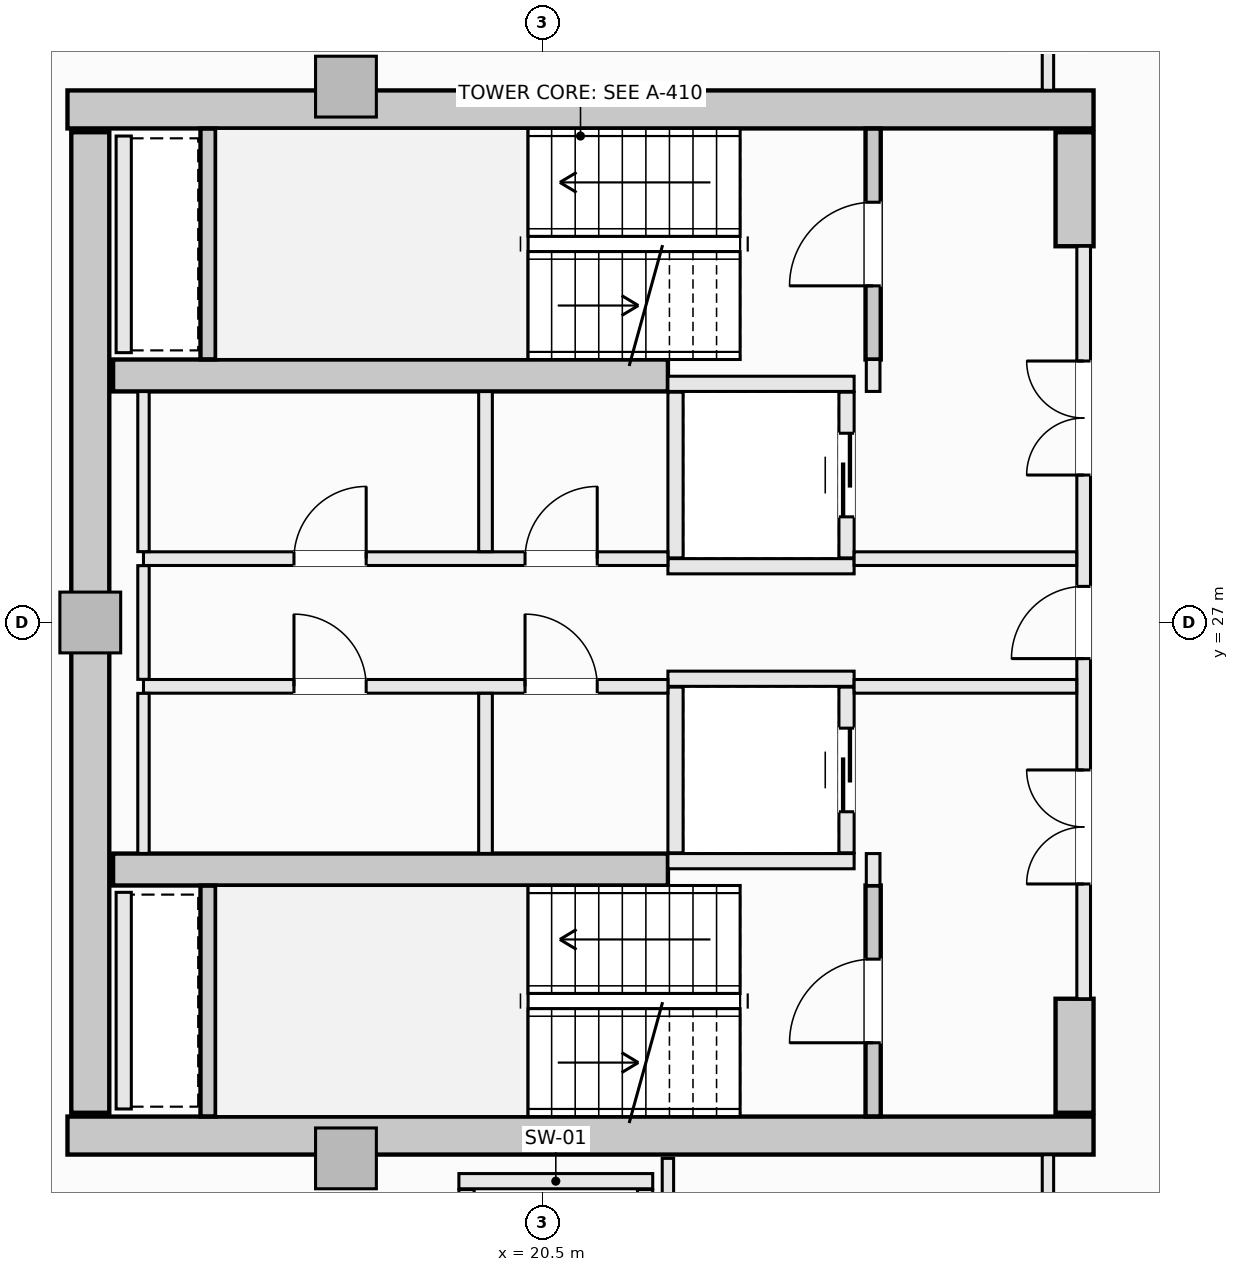
"""IFC4 building model, lengths in metres.
Left out: names, types, materials, properties, quantities, classifications, styles, units other than length and angle.
Written with IfcOpenShell. Run it as: python <this file> out.ifc"""

import sys

from ifc_helpers import new_model, si_unit, direction, frame, frame_2d, origin, origin_2d, place, context, subcontext, project, spatial, rectangle, extrude, element, fill, save


model = new_model("IFC4")
c1 = context("Model", 3, precision=1e-05, world=origin(), true_north=direction((0.0, 1.0)))
c2 = subcontext(c1, "Body", "Model", "MODEL_VIEW")
j1 = project(units=[si_unit("LENGTHUNIT", "METRE"), si_unit("PLANEANGLEUNIT", "RADIAN")], contexts=[c1])
p1 = place(None, origin())
s1 = spatial("IfcSite", under=j1, at=p1, CompositionType="ELEMENT")
p2 = place(p1, origin())
s2 = spatial("IfcBuilding", under=s1, at=p2, CompositionType="ELEMENT")
p3 = place(p2, frame((0.0, 0.0, 255.8)))
s3 = spatial("IfcBuildingStorey", under=s2, at=p3, CompositionType="ELEMENT", Elevation=255.8)
for number, where, z_axis, x_axis in (
    (1, (14.25, 33.75, -0.27), (0.0, 0.0, 1.0), (1.0, 0.0, 0.0)),
    (2, (14.25, 20.25, -0.27), (0.0, 0.0, 1.0), (1.0, 0.0, 0.0)),
):
    element("IfcWall", number, at=place(p3, frame(where, z_axis=z_axis, x_axis=x_axis)), inside=s3, PredefinedType="SHEAR", context=c2, shape_type="SweptSolid", body=[
        extrude(rectangle(XDim=13.5, YDim=0.5, at=frame_2d((6.75, 0.0))), origin(), (0.0, 0.0, 1.0), 3.3),
    ])
p4 = place(p3, frame((14.55, 20.55, -0.27), z_axis=(0.0, 0.0, 1.0), x_axis=(0.0, 1.0, 0.0)))
e3 = element("IfcWall", 3, at=p4, inside=s3, PredefinedType="SHEAR", context=c2, shape_type="SweptSolid", body=[
    extrude(rectangle(XDim=12.9, YDim=0.5, at=frame_2d((6.45, 0.0))), origin(), (0.0, 0.0, 1.0), 3.3),
])
for number, where, z_axis, x_axis in (
    (4, (27.5, 31.95, -0.27), (0.0, 0.0, 1.0), (0.0, 1.0, 0.0)),
    (5, (27.5, 20.55, -0.27), (0.0, 0.0, 1.0), (0.0, 1.0, 0.0)),
):
    element("IfcWall", number, at=place(p3, frame(where, z_axis=z_axis, x_axis=x_axis)), inside=s3, PredefinedType="SHEAR", context=c2, shape_type="SweptSolid", body=[
        extrude(rectangle(XDim=1.5, YDim=0.5, at=frame_2d((0.75, 0.0))), origin(), (0.0, 0.0, 1.0), 3.3),
    ])
for number, where, z_axis, x_axis in (
    (6, (14.85, 30.25, -0.27), (0.0, 0.0, 1.0), (1.0, 0.0, 0.0)),
    (7, (14.85, 23.75, -0.27), (0.0, 0.0, 1.0), (1.0, 0.0, 0.0)),
):
    element("IfcWall", number, at=place(p3, frame(where, z_axis=z_axis, x_axis=x_axis)), inside=s3, PredefinedType="SHEAR", context=c2, shape_type="SweptSolid", body=[
        extrude(rectangle(XDim=7.3, YDim=0.42, at=frame_2d((3.65, 0.0))), origin(), (0.0, 0.0, 1.0), 3.3),
    ])
for number, where, z_axis, x_axis in (
    (8, (17.914, 34.05, -0.27), (0.0, 0.0, 1.0), (1.0, 0.0, 0.0)),
    (9, (14.55, 27.0, -0.27), (0.0, 0.0, 1.0), (1.0, 0.0, 0.0)),
    (10, (17.914, 19.95, -0.27), (0.0, 0.0, 1.0), (1.0, 0.0, 0.0)),
):
    element("IfcColumn", number, at=place(p3, frame(where, z_axis=z_axis, x_axis=x_axis)), inside=s3, PredefinedType="PILASTER", context=c2, shape_type="SweptSolid", body=[
        extrude(rectangle(XDim=0.8, YDim=0.8, at=origin_2d()), origin(), (0.0, 0.0, 1.0), 3.3),
    ])
p5 = place(p3, frame((24.85, 30.46, -0.27), z_axis=(0.0, 0.0, 1.0), x_axis=(0.0, 1.0, 0.0)))
e11 = element("IfcWall", 11, at=p5, inside=s3, PredefinedType="SHEAR", context=c2, shape_type="SweptSolid", body=[
    extrude(rectangle(XDim=3.038, YDim=0.2, at=frame_2d((1.519, 0.0))), origin(), (0.0, 0.0, 1.0), 3.3),
])
p6 = place(p5, frame((0.969, 0.0, 0.27)))
e12 = element("IfcOpeningElement", 12, at=p6, cuts=e11, PredefinedType="OPENING", context=c2, shape_type="SweptSolid", body=[
    extrude(rectangle(XDim=1.1, YDim=2.15, at=frame_2d((0.55, 1.075))), frame((0.0, 0.11, 0.0), z_axis=(0.0, -1.0, 0.0), x_axis=(1.0, 0.0, 0.0)), (0.0, 0.0, 1.0), 0.22),
])
p7 = place(p3, frame((16.1, 30.462, -0.27), z_axis=(0.0, 0.0, 1.0), x_axis=(0.0, 1.0, 0.0)))
e13 = element("IfcWall", 13, at=p7, inside=s3, PredefinedType="SHEAR", context=c2, shape_type="SweptSolid", body=[
    extrude(rectangle(XDim=3.036, YDim=0.2, at=frame_2d((1.518, 0.0))), origin(), (0.0, 0.0, 1.0), 3.3),
])
p8 = place(p3, frame((24.85, 20.502, -0.27), z_axis=(0.0, 0.0, 1.0), x_axis=(0.0, 1.0, 0.0)))
e14 = element("IfcWall", 14, at=p8, inside=s3, PredefinedType="SHEAR", context=c2, shape_type="SweptSolid", body=[
    extrude(rectangle(XDim=3.038, YDim=0.2, at=frame_2d((1.519, 0.0))), origin(), (0.0, 0.0, 1.0), 3.3),
])
p9 = place(p8, frame((0.969, 0.0, 0.27)))
e15 = element("IfcOpeningElement", 15, at=p9, cuts=e14, PredefinedType="OPENING", context=c2, shape_type="SweptSolid", body=[
    extrude(rectangle(XDim=1.1, YDim=2.15, at=frame_2d((0.55, 1.075))), frame((0.0, 0.11, 0.0), z_axis=(0.0, -1.0, 0.0), x_axis=(1.0, 0.0, 0.0)), (0.0, 0.0, 1.0), 0.22),
])
p10 = place(p3, frame((16.1, 20.502, -0.27), z_axis=(0.0, 0.0, 1.0), x_axis=(0.0, 1.0, 0.0)))
e16 = element("IfcWall", 16, at=p10, inside=s3, PredefinedType="SHEAR", context=c2, shape_type="SweptSolid", body=[
    extrude(rectangle(XDim=3.036, YDim=0.2, at=frame_2d((1.518, 0.0))), origin(), (0.0, 0.0, 1.0), 3.3),
])
for number, where, z_axis, x_axis in (
    (17, (22.15, 30.14, 0.0), (0.0, 0.0, 1.0), (1.0, 0.0, 0.0)),
    (18, (22.15, 27.74, 0.0), (0.0, 0.0, 1.0), (1.0, 0.0, 0.0)),
):
    element("IfcWall", number, at=place(p3, frame(where, z_axis=z_axis, x_axis=x_axis)), inside=s3, PredefinedType="SOLIDWALL", context=c2, shape_type="SweptSolid", body=[
        extrude(rectangle(XDim=2.45, YDim=0.2, at=frame_2d((1.225, 0.0))), origin(), (0.0, 0.0, 1.0), 3.03),
    ])
p11 = place(p3, frame((22.25, 27.85, 0.0), z_axis=(0.0, 0.0, 1.0), x_axis=(0.0, 1.0, 0.0)))
e19 = element("IfcWall", 19, at=p11, inside=s3, PredefinedType="SOLIDWALL", context=c2, shape_type="SweptSolid", body=[
    extrude(rectangle(XDim=2.18, YDim=0.2, at=frame_2d((1.09, 0.0))), origin(), (0.0, 0.0, 1.0), 3.03),
])
p12 = place(p3, frame((24.5, 27.85, 0.0), z_axis=(0.0, 0.0, 1.0), x_axis=(0.0, 1.0, 0.0)))
e20 = element("IfcWall", 20, at=p12, inside=s3, PredefinedType="SOLIDWALL", context=c2, shape_type="SweptSolid", body=[
    extrude(rectangle(XDim=2.18, YDim=0.2, at=frame_2d((1.09, 0.0))), origin(), (0.0, 0.0, 1.0), 3.03),
])
p13 = place(p12, frame((0.54, 0.0, 0.0)))
e21 = element("IfcOpeningElement", 21, at=p13, cuts=e20, PredefinedType="OPENING", context=c2, shape_type="SweptSolid", body=[
    extrude(rectangle(XDim=1.1, YDim=2.2, at=frame_2d((0.55, 1.1))), frame((0.0, 0.11, 0.0), z_axis=(0.0, -1.0, 0.0), x_axis=(1.0, 0.0, 0.0)), (0.0, 0.0, 1.0), 0.22),
])
for number, where, z_axis, x_axis in (
    (22, (22.15, 26.26, 0.0), (0.0, 0.0, 1.0), (1.0, 0.0, 0.0)),
    (23, (22.15, 23.86, 0.0), (0.0, 0.0, 1.0), (1.0, 0.0, 0.0)),
):
    element("IfcWall", number, at=place(p3, frame(where, z_axis=z_axis, x_axis=x_axis)), inside=s3, PredefinedType="SOLIDWALL", context=c2, shape_type="SweptSolid", body=[
        extrude(rectangle(XDim=2.45, YDim=0.2, at=frame_2d((1.225, 0.0))), origin(), (0.0, 0.0, 1.0), 3.03),
    ])
p14 = place(p3, frame((22.25, 23.97, 0.0), z_axis=(0.0, 0.0, 1.0), x_axis=(0.0, 1.0, 0.0)))
e24 = element("IfcWall", 24, at=p14, inside=s3, PredefinedType="SOLIDWALL", context=c2, shape_type="SweptSolid", body=[
    extrude(rectangle(XDim=2.18, YDim=0.2, at=frame_2d((1.09, 0.0))), origin(), (0.0, 0.0, 1.0), 3.03),
])
p15 = place(p3, frame((24.5, 23.97, 0.0), z_axis=(0.0, 0.0, 1.0), x_axis=(0.0, 1.0, 0.0)))
e25 = element("IfcWall", 25, at=p15, inside=s3, PredefinedType="SOLIDWALL", context=c2, shape_type="SweptSolid", body=[
    extrude(rectangle(XDim=2.18, YDim=0.2, at=frame_2d((1.09, 0.0))), origin(), (0.0, 0.0, 1.0), 3.03),
])
p16 = place(p15, frame((0.54, 0.0, 0.0)))
e26 = element("IfcOpeningElement", 26, at=p16, cuts=e25, PredefinedType="OPENING", context=c2, shape_type="SweptSolid", body=[
    extrude(rectangle(XDim=1.1, YDim=2.2, at=frame_2d((0.55, 1.1))), frame((0.0, 0.11, 0.0), z_axis=(0.0, -1.0, 0.0), x_axis=(1.0, 0.0, 0.0)), (0.0, 0.0, 1.0), 0.22),
])
p17 = place(p3, frame((19.4, 19.65, 0.0), z_axis=(0.0, 0.0, 1.0), x_axis=(1.0, 0.0, 0.0)))
e27 = element("IfcWall", 27, at=p17, inside=s3, PredefinedType="SOLIDWALL", context=c2, shape_type="SweptSolid", body=[
    extrude(rectangle(XDim=2.55, YDim=0.2, at=frame_2d((1.275, 0.0))), origin(), (0.0, 0.0, 1.0), 3.03),
])
for number, where, z_axis, x_axis in (
    (28, (19.5, 17.01, 0.0), (0.0, 0.0, 1.0), (0.0, 1.0, 0.0)),
    (29, (21.85, 17.01, 0.0), (0.0, 0.0, 1.0), (0.0, 1.0, 0.0)),
):
    element("IfcWall", number, at=place(p3, frame(where, z_axis=z_axis, x_axis=x_axis)), inside=s3, PredefinedType="SOLIDWALL", context=c2, shape_type="SweptSolid", body=[
        extrude(rectangle(XDim=2.53, YDim=0.2, at=frame_2d((1.265, 0.0))), origin(), (0.0, 0.0, 1.0), 3.03),
    ])
for number, where, z_axis, x_axis in (
    (30, (14.99, 30.55, 0.0), (0.0, 0.0, 1.0), (0.0, 1.0, 0.0)),
    (31, (14.99, 20.6, 0.0), (0.0, 0.0, 1.0), (0.0, 1.0, 0.0)),
):
    element("IfcWall", number, at=place(p3, frame(where, z_axis=z_axis, x_axis=x_axis)), inside=s3, PredefinedType="SOLIDWALL", context=c2, shape_type="SweptSolid", body=[
        extrude(rectangle(XDim=2.85, YDim=0.2, at=frame_2d((1.425, 0.0))), origin(), (0.0, 0.0, 1.0), 3.03),
    ])
for number, where, z_axis, x_axis in (
    (32, (24.85, 23.54, 0.0), (0.0, 0.0, 1.0), (0.0, 1.0, 0.0)),
    (33, (24.85, 30.04, 0.0), (0.0, 0.0, 1.0), (0.0, 1.0, 0.0)),
):
    element("IfcWall", number, at=place(p3, frame(where, z_axis=z_axis, x_axis=x_axis)), inside=s3, PredefinedType="SOLIDWALL", context=c2, shape_type="SweptSolid", body=[
        extrude(rectangle(XDim=0.42, YDim=0.18, at=frame_2d((0.21, 0.0))), origin(), (0.0, 0.0, 1.0), 3.03),
    ])
p18 = place(p3, frame((27.62, 22.05, 0.0), z_axis=(0.0, 0.0, 1.0), x_axis=(0.0, 1.0, 0.0)))
e34 = element("IfcWall", 34, at=p18, inside=s3, PredefinedType="SOLIDWALL", context=c2, shape_type="SweptSolid", body=[
    extrude(rectangle(XDim=9.9, YDim=0.18, at=frame_2d((4.95, 0.0))), origin(), (0.0, 0.0, 1.0), 3.03),
])
p19 = place(p18, frame((4.475, 0.0, 0.0)))
e35 = element("IfcOpeningElement", 35, at=p19, cuts=e34, PredefinedType="OPENING", context=c2, shape_type="SweptSolid", body=[
    extrude(rectangle(XDim=0.95, YDim=2.1, at=frame_2d((0.475, 1.05))), frame((0.0, 0.1, 0.0), z_axis=(0.0, -1.0, 0.0), x_axis=(1.0, 0.0, 0.0)), (0.0, 0.0, 1.0), 0.2),
])
p20 = place(p18, frame((6.89, 0.0, 0.0)))
e36 = element("IfcOpeningElement", 36, at=p20, cuts=e34, PredefinedType="OPENING", context=c2, shape_type="SweptSolid", body=[
    extrude(rectangle(XDim=1.5, YDim=2.2, at=frame_2d((0.75, 1.1))), frame((0.0, 0.1, 0.0), z_axis=(0.0, -1.0, 0.0), x_axis=(1.0, 0.0, 0.0)), (0.0, 0.0, 1.0), 0.2),
])
p21 = place(p18, frame((1.51, 0.0, 0.0)))
e37 = element("IfcOpeningElement", 37, at=p21, cuts=e34, PredefinedType="OPENING", context=c2, shape_type="SweptSolid", body=[
    extrude(rectangle(XDim=1.5, YDim=2.2, at=frame_2d((0.75, 1.1))), frame((0.0, 0.1, 0.0), z_axis=(0.0, -1.0, 0.0), x_axis=(1.0, 0.0, 0.0)), (0.0, 0.0, 1.0), 0.2),
])
p22 = place(p3, frame((15.25, 27.84, 0.0), z_axis=(0.0, 0.0, 1.0), x_axis=(1.0, 0.0, 0.0)))
e38 = element("IfcWall", 38, at=p22, inside=s3, PredefinedType="SOLIDWALL", context=c2, shape_type="SweptSolid", body=[
    extrude(rectangle(XDim=6.9, YDim=0.18, at=frame_2d((3.45, 0.0))), origin(), (0.0, 0.0, 1.0), 3.03),
])
p23 = place(p22, frame((5.02, 0.0, 0.0)))
e39 = element("IfcOpeningElement", 39, at=p23, cuts=e38, PredefinedType="OPENING", context=c2, shape_type="SweptSolid", body=[
    extrude(rectangle(XDim=0.95, YDim=2.1, at=frame_2d((0.475, 1.05))), frame((0.0, 0.1, 0.0), z_axis=(0.0, -1.0, 0.0), x_axis=(1.0, 0.0, 0.0)), (0.0, 0.0, 1.0), 0.2),
])
p24 = place(p22, frame((1.98, 0.0, 0.0)))
e40 = element("IfcOpeningElement", 40, at=p24, cuts=e38, PredefinedType="OPENING", context=c2, shape_type="SweptSolid", body=[
    extrude(rectangle(XDim=0.95, YDim=2.1, at=frame_2d((0.475, 1.05))), frame((0.0, 0.1, 0.0), z_axis=(0.0, -1.0, 0.0), x_axis=(1.0, 0.0, 0.0)), (0.0, 0.0, 1.0), 0.2),
])
p25 = place(p3, frame((24.6, 27.84, 0.0), z_axis=(0.0, 0.0, 1.0), x_axis=(1.0, 0.0, 0.0)))
e41 = element("IfcWall", 41, at=p25, inside=s3, PredefinedType="SOLIDWALL", context=c2, shape_type="SweptSolid", body=[
    extrude(rectangle(XDim=2.928, YDim=0.18, at=frame_2d((1.464, 0.0))), origin(), (0.0, 0.0, 1.0), 3.03),
])
p26 = place(p3, frame((15.25, 26.16, 0.0), z_axis=(0.0, 0.0, 1.0), x_axis=(1.0, 0.0, 0.0)))
e42 = element("IfcWall", 42, at=p26, inside=s3, PredefinedType="SOLIDWALL", context=c2, shape_type="SweptSolid", body=[
    extrude(rectangle(XDim=6.9, YDim=0.18, at=frame_2d((3.45, 0.0))), origin(), (0.0, 0.0, 1.0), 3.03),
])
p27 = place(p26, frame((5.02, 0.0, 0.0)))
e43 = element("IfcOpeningElement", 43, at=p27, cuts=e42, PredefinedType="OPENING", context=c2, shape_type="SweptSolid", body=[
    extrude(rectangle(XDim=0.95, YDim=2.1, at=frame_2d((0.475, 1.05))), frame((0.0, 0.1, 0.0), z_axis=(0.0, -1.0, 0.0), x_axis=(1.0, 0.0, 0.0)), (0.0, 0.0, 1.0), 0.2),
])
p28 = place(p26, frame((1.98, 0.0, 0.0)))
e44 = element("IfcOpeningElement", 44, at=p28, cuts=e42, PredefinedType="OPENING", context=c2, shape_type="SweptSolid", body=[
    extrude(rectangle(XDim=0.95, YDim=2.1, at=frame_2d((0.475, 1.05))), frame((0.0, 0.1, 0.0), z_axis=(0.0, -1.0, 0.0), x_axis=(1.0, 0.0, 0.0)), (0.0, 0.0, 1.0), 0.2),
])
p29 = place(p3, frame((24.6, 26.16, 0.0), z_axis=(0.0, 0.0, 1.0), x_axis=(1.0, 0.0, 0.0)))
e45 = element("IfcWall", 45, at=p29, inside=s3, PredefinedType="SOLIDWALL", context=c2, shape_type="SweptSolid", body=[
    extrude(rectangle(XDim=2.928, YDim=0.18, at=frame_2d((1.464, 0.0))), origin(), (0.0, 0.0, 1.0), 3.03),
])
p30 = place(p3, frame((15.25, 23.962, 0.0), z_axis=(0.0, 0.0, 1.0), x_axis=(0.0, 1.0, 0.0)))
e46 = element("IfcWall", 46, at=p30, inside=s3, PredefinedType="PARTITIONING", context=c2, shape_type="SweptSolid", body=[
    extrude(rectangle(XDim=2.106, YDim=0.15, at=frame_2d((1.053, 0.0))), origin(), (0.0, 0.0, 1.0), 3.03),
])
p31 = place(p3, frame((15.25, 26.252, 0.0), z_axis=(0.0, 0.0, 1.0), x_axis=(0.0, 1.0, 0.0)))
e47 = element("IfcWall", 47, at=p31, inside=s3, PredefinedType="PARTITIONING", context=c2, shape_type="SweptSolid", body=[
    extrude(rectangle(XDim=1.496, YDim=0.15, at=frame_2d((0.748, 0.0))), origin(), (0.0, 0.0, 1.0), 3.03),
])
p32 = place(p3, frame((15.25, 27.932, 0.0), z_axis=(0.0, 0.0, 1.0), x_axis=(0.0, 1.0, 0.0)))
e48 = element("IfcWall", 48, at=p32, inside=s3, PredefinedType="PARTITIONING", context=c2, shape_type="SweptSolid", body=[
    extrude(rectangle(XDim=2.106, YDim=0.15, at=frame_2d((1.053, 0.0))), origin(), (0.0, 0.0, 1.0), 3.03),
])
for number, where, z_axis, x_axis in (
    (49, (19.75, 23.962, 0.0), (0.0, 0.0, 1.0), (0.0, 1.0, 0.0)),
    (50, (19.75, 27.932, 0.0), (0.0, 0.0, 1.0), (0.0, 1.0, 0.0)),
):
    element("IfcWall", number, at=place(p3, frame(where, z_axis=z_axis, x_axis=x_axis)), inside=s3, PredefinedType="SOLIDWALL", context=c2, shape_type="SweptSolid", body=[
        extrude(rectangle(XDim=2.106, YDim=0.18, at=frame_2d((1.053, 0.0))), origin(), (0.0, 0.0, 1.0), 3.03),
    ])
p33 = place(p3, frame((22.15, 17.127, 0.0), z_axis=(0.0, 0.0, 1.0), x_axis=(0.0, 1.0, 0.0)))
e51 = element("IfcWall", 51, at=p33, inside=s3, PredefinedType="PARTITIONING", context=c2, shape_type="SweptSolid", body=[
    extrude(rectangle(XDim=2.823, YDim=0.15, at=frame_2d((1.412, 0.0))), origin(), (0.0, 0.0, 1.0), 3.03),
])
p34 = place(p3, frame((27.15, 17.127, 0.0), z_axis=(0.0, 0.0, 1.0), x_axis=(0.0, 1.0, 0.0)))
e52 = element("IfcWall", 52, at=p34, inside=s3, PredefinedType="PARTITIONING", context=c2, shape_type="SweptSolid", body=[
    extrude(rectangle(XDim=2.871, YDim=0.15, at=frame_2d((1.436, 0.0))), origin(), (0.0, 0.0, 1.0), 3.03),
])
p35 = place(p34, frame((0.96, 0.0, 0.0)))
e53 = element("IfcOpeningElement", 53, at=p35, cuts=e52, PredefinedType="OPENING", context=c2, shape_type="SweptSolid", body=[
    extrude(rectangle(XDim=0.95, YDim=2.1, at=frame_2d((0.475, 1.05))), frame((0.0, 0.085, 0.0), z_axis=(0.0, -1.0, 0.0), x_axis=(1.0, 0.0, 0.0)), (0.0, 0.0, 1.0), 0.17),
])
p36 = place(p3, frame((27.15, 34.002, 0.0), z_axis=(0.0, 0.0, 1.0), x_axis=(0.0, 1.0, 0.0)))
e54 = element("IfcWall", 54, at=p36, inside=s3, PredefinedType="PARTITIONING", context=c2, shape_type="SweptSolid", body=[
    extrude(rectangle(XDim=4.198, YDim=0.15, at=frame_2d((2.099, 0.0))), origin(), (0.0, 0.0, 1.0), 3.03),
])
p37 = place(p36, frame((1.998, 0.0, 0.0)))
e55 = element("IfcOpeningElement", 55, at=p37, cuts=e54, PredefinedType="OPENING", context=c2, shape_type="SweptSolid", body=[
    extrude(rectangle(XDim=0.95, YDim=2.1, at=frame_2d((0.475, 1.05))), frame((0.0, 0.085, 0.0), z_axis=(0.0, -1.0, 0.0), x_axis=(1.0, 0.0, 0.0)), (0.0, 0.0, 1.0), 0.17),
])
p38 = place(p6, origin())
e56 = element("IfcDoor", 56, at=p38, inside=s3, OperationType="SINGLE_SWING_LEFT", PredefinedType="DOOR", context=c2, shape_type="SweptSolid", body=[
    extrude(rectangle(XDim=1.1, YDim=2.15, at=frame_2d((0.55, 1.075))), frame((0.0, 0.025, 0.0), z_axis=(0.0, -1.0, 0.0), x_axis=(1.0, 0.0, 0.0)), (0.0, 0.0, 1.0), 0.05),
])
fill(e12, e56)
p39 = place(p9, origin())
e57 = element("IfcDoor", 57, at=p39, inside=s3, OperationType="SINGLE_SWING_LEFT", PredefinedType="DOOR", context=c2, shape_type="SweptSolid", body=[
    extrude(rectangle(XDim=1.1, YDim=2.15, at=frame_2d((0.55, 1.075))), frame((0.0, 0.025, 0.0), z_axis=(0.0, -1.0, 0.0), x_axis=(1.0, 0.0, 0.0)), (0.0, 0.0, 1.0), 0.05),
])
fill(e15, e57)
p40 = place(p13, origin())
e58 = element("IfcDoor", 58, at=p40, inside=s3, OperationType="SLIDING_TO_LEFT", PredefinedType="DOOR", context=c2, shape_type="SweptSolid", body=[
    extrude(rectangle(XDim=1.1, YDim=2.2, at=frame_2d((0.55, 1.1))), frame((0.0, 0.025, 0.0), z_axis=(0.0, -1.0, 0.0), x_axis=(1.0, 0.0, 0.0)), (0.0, 0.0, 1.0), 0.05),
])
fill(e21, e58)
p41 = place(p16, origin())
e59 = element("IfcDoor", 59, at=p41, inside=s3, OperationType="SLIDING_TO_LEFT", PredefinedType="DOOR", context=c2, shape_type="SweptSolid", body=[
    extrude(rectangle(XDim=1.1, YDim=2.2, at=frame_2d((0.55, 1.1))), frame((0.0, 0.025, 0.0), z_axis=(0.0, -1.0, 0.0), x_axis=(1.0, 0.0, 0.0)), (0.0, 0.0, 1.0), 0.05),
])
fill(e26, e59)
p42 = place(p19, origin())
e60 = element("IfcDoor", 60, at=p42, inside=s3, OperationType="SINGLE_SWING_LEFT", PredefinedType="DOOR", context=c2, shape_type="SweptSolid", body=[
    extrude(rectangle(XDim=0.95, YDim=2.1, at=frame_2d((0.475, 1.05))), frame((0.0, 0.025, 0.0), z_axis=(0.0, -1.0, 0.0), x_axis=(1.0, 0.0, 0.0)), (0.0, 0.0, 1.0), 0.05),
])
fill(e35, e60)
p43 = place(p20, origin())
e61 = element("IfcDoor", 61, at=p43, inside=s3, OperationType="DOUBLE_DOOR_SINGLE_SWING", PredefinedType="DOOR", context=c2, shape_type="SweptSolid", body=[
    extrude(rectangle(XDim=1.5, YDim=2.2, at=frame_2d((0.75, 1.1))), frame((0.0, 0.025, 0.0), z_axis=(0.0, -1.0, 0.0), x_axis=(1.0, 0.0, 0.0)), (0.0, 0.0, 1.0), 0.05),
])
fill(e36, e61)
p44 = place(p21, origin())
e62 = element("IfcDoor", 62, at=p44, inside=s3, OperationType="DOUBLE_DOOR_SINGLE_SWING", PredefinedType="DOOR", context=c2, shape_type="SweptSolid", body=[
    extrude(rectangle(XDim=1.5, YDim=2.2, at=frame_2d((0.75, 1.1))), frame((0.0, 0.025, 0.0), z_axis=(0.0, -1.0, 0.0), x_axis=(1.0, 0.0, 0.0)), (0.0, 0.0, 1.0), 0.05),
])
fill(e37, e62)
p45 = place(p23, origin())
e63 = element("IfcDoor", 63, at=p45, inside=s3, OperationType="SINGLE_SWING_RIGHT", PredefinedType="DOOR", context=c2, shape_type="SweptSolid", body=[
    extrude(rectangle(XDim=0.95, YDim=2.1, at=frame_2d((0.475, 1.05))), frame((0.0, 0.025, 0.0), z_axis=(0.0, -1.0, 0.0), x_axis=(1.0, 0.0, 0.0)), (0.0, 0.0, 1.0), 0.05),
])
fill(e39, e63)
p46 = place(p27, origin())
e64 = element("IfcDoor", 64, at=p46, inside=s3, OperationType="SINGLE_SWING_LEFT", PredefinedType="DOOR", context=c2, shape_type="SweptSolid", body=[
    extrude(rectangle(XDim=0.95, YDim=2.1, at=frame_2d((0.475, 1.05))), frame((0.0, 0.025, 0.0), z_axis=(0.0, -1.0, 0.0), x_axis=(1.0, 0.0, 0.0)), (0.0, 0.0, 1.0), 0.05),
])
fill(e43, e64)
p47 = place(p24, origin())
e65 = element("IfcDoor", 65, at=p47, inside=s3, OperationType="SINGLE_SWING_RIGHT", PredefinedType="DOOR", context=c2, shape_type="SweptSolid", body=[
    extrude(rectangle(XDim=0.95, YDim=2.1, at=frame_2d((0.475, 1.05))), frame((0.0, 0.025, 0.0), z_axis=(0.0, -1.0, 0.0), x_axis=(1.0, 0.0, 0.0)), (0.0, 0.0, 1.0), 0.05),
])
fill(e40, e65)
p48 = place(p28, origin())
e66 = element("IfcDoor", 66, at=p48, inside=s3, OperationType="SINGLE_SWING_LEFT", PredefinedType="DOOR", context=c2, shape_type="SweptSolid", body=[
    extrude(rectangle(XDim=0.95, YDim=2.1, at=frame_2d((0.475, 1.05))), frame((0.0, 0.025, 0.0), z_axis=(0.0, -1.0, 0.0), x_axis=(1.0, 0.0, 0.0)), (0.0, 0.0, 1.0), 0.05),
])
fill(e44, e66)
save(model, sys.argv[1])
